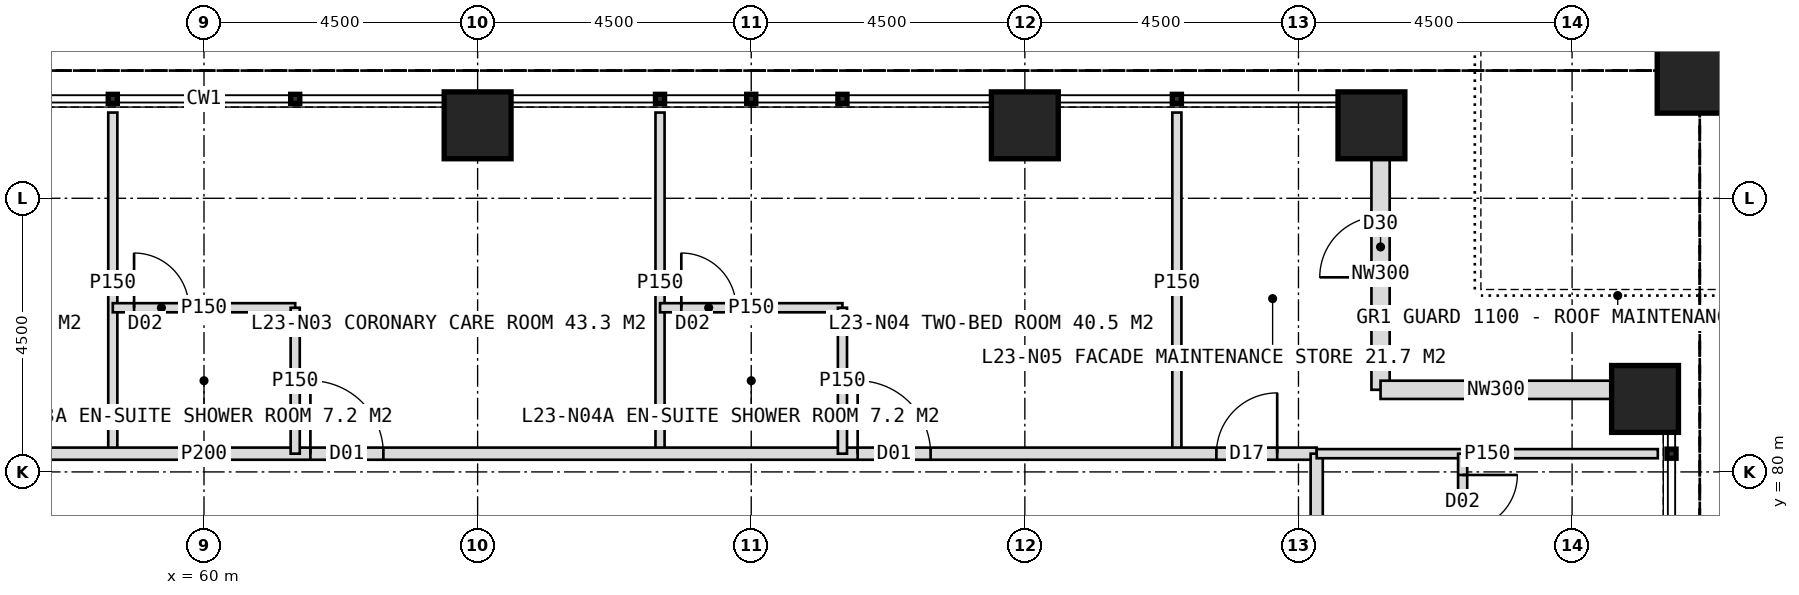
"""IFC4 building model, lengths in metres.
Left out: names, types, materials, properties, quantities, classifications, styles, units other than length and angle.
Written with IfcOpenShell. Run it as: python <this file> out.ifc"""

import sys

from ifc_helpers import new_model, si_unit, direction, frame, frame_2d, origin, origin_2d, place, context, subcontext, project, spatial, rectangle, hollow_rectangle, extrude, element, fill, save


model = new_model("IFC4")
c1 = context("Model", 3, precision=1e-05, world=origin(), true_north=direction((0.0, 1.0)))
c2 = subcontext(c1, "Body", "Model", "MODEL_VIEW")
j1 = project(units=[si_unit("LENGTHUNIT", "METRE"), si_unit("PLANEANGLEUNIT", "RADIAN")], contexts=[c1])
p1 = place(None, origin())
s1 = spatial("IfcSite", under=j1, at=p1, CompositionType="ELEMENT")
p2 = place(p1, origin())
s2 = spatial("IfcBuilding", under=s1, at=p2, CompositionType="ELEMENT")
p3 = place(p2, frame((0.0, 0.0, 100.0)))
s3 = spatial("IfcBuildingStorey", under=s2, at=p3, CompositionType="ELEMENT", Elevation=100.0)
for number, where, z_axis, x_axis in (
    (1, (64.5, 85.7, 0.0), (0.0, 0.0, 1.0), (1.0, 0.0, 0.0)),
    (2, (73.5, 85.7, 0.0), (0.0, 0.0, 1.0), (1.0, 0.0, 0.0)),
    (3, (79.2, 85.7, 0.0), (0.0, 0.0, 1.0), (1.0, 0.0, 0.0)),
    (4, (83.7, 81.2, 0.0), (0.0, 0.0, 1.0), (1.0, 0.0, 0.0)),
):
    element("IfcColumn", number, at=place(p3, frame(where, z_axis=z_axis, x_axis=x_axis)), inside=s3, PredefinedType="COLUMN", context=c2, shape_type="SweptSolid", body=[
        extrude(hollow_rectangle(XDim=1.1, YDim=1.1, WallThickness=0.1, at=origin_2d()), origin(), (0.0, 0.0, 1.0), 4.0),
    ])
p4 = place(p3, frame((84.6, 86.6, 2.0), z_axis=(0.0, 0.0, 1.0), x_axis=(1.0, 0.0, 0.0)))
e5 = element("IfcColumn", 5, at=p4, inside=s3, PredefinedType="COLUMN", context=c2, shape_type="SweptSolid", body=[
    extrude(hollow_rectangle(XDim=1.4, YDim=1.4, WallThickness=0.08, at=origin_2d()), origin(), (0.0, 0.0, 1.0), 2.0),
])
p5 = place(p3, frame((79.35, 85.15, 0.0), z_axis=(0.0, 0.0, 1.0), x_axis=(0.0, -1.0, 0.0)))
e6 = element("IfcWall", 6, at=p5, inside=s3, PredefinedType="ELEMENTEDWALL", context=c2, shape_type="SweptSolid", body=[
    extrude(rectangle(XDim=3.8, YDim=0.3, at=frame_2d((1.9, 0.0))), origin(), (0.0, 0.0, 1.0), 4.0),
])
p6 = place(p5, frame((0.95, 0.0, 0.0)))
e7 = element("IfcOpeningElement", 7, at=p6, cuts=e6, PredefinedType="OPENING", context=c2, shape_type="SweptSolid", body=[
    extrude(rectangle(XDim=1.0, YDim=2.1, at=frame_2d((0.5, 1.05))), frame((0.0, 0.16, 0.0), z_axis=(0.0, -1.0, 0.0), x_axis=(1.0, 0.0, 0.0)), (0.0, 0.0, 1.0), 0.32),
])
p7 = place(p3, frame((79.35, 81.35, 0.0), z_axis=(0.0, 0.0, 1.0), x_axis=(1.0, 0.0, 0.0)))
e8 = element("IfcWall", 8, at=p7, inside=s3, PredefinedType="ELEMENTEDWALL", context=c2, shape_type="SweptSolid", body=[
    extrude(rectangle(XDim=3.8, YDim=0.3, at=frame_2d((1.9, 0.0))), origin(), (0.0, 0.0, 1.0), 4.0),
])
for number, where, z_axis, x_axis in (
    (9, (58.5, 80.3, 0.0), (0.0, 0.0, 1.0), (0.0, 1.0, 0.0)),
    (10, (67.5, 80.3, 0.0), (0.0, 0.0, 1.0), (0.0, 1.0, 0.0)),
    (11, (76.0, 80.3, 0.0), (0.0, 0.0, 1.0), (0.0, 1.0, 0.0)),
):
    element("IfcWall", number, at=place(p3, frame(where, z_axis=z_axis, x_axis=x_axis)), inside=s3, PredefinedType="PARTITIONING", context=c2, shape_type="SweptSolid", body=[
        extrude(rectangle(XDim=5.61, YDim=0.15, at=frame_2d((2.805, 0.0))), origin(), (0.0, 0.0, 1.0), 3.75),
    ])
p8 = place(p3, frame((41.7, 80.3, 0.0), z_axis=(0.0, 0.0, 1.0), x_axis=(1.0, 0.0, 0.0)))
e12 = element("IfcWall", 12, at=p8, inside=s3, PredefinedType="PARTITIONING", context=c2, shape_type="SweptSolid", body=[
    extrude(rectangle(XDim=36.6, YDim=0.2, at=frame_2d((18.3, 0.0))), origin(), (0.0, 0.0, 1.0), 3.75),
])
p9 = place(p8, frame((3.25, 0.0, 0.0)))
e13 = element("IfcOpeningElement", 13, at=p9, cuts=e12, PredefinedType="OPENING", context=c2, shape_type="SweptSolid", body=[
    extrude(rectangle(XDim=1.2, YDim=2.2, at=frame_2d((0.6, 1.1))), frame((0.0, 0.11, 0.0), z_axis=(0.0, -1.0, 0.0), x_axis=(1.0, 0.0, 0.0)), (0.0, 0.0, 1.0), 0.22),
])
p10 = place(p8, frame((11.05, 0.0, 0.0)))
e14 = element("IfcOpeningElement", 14, at=p10, cuts=e12, PredefinedType="OPENING", context=c2, shape_type="SweptSolid", body=[
    extrude(rectangle(XDim=1.2, YDim=2.2, at=frame_2d((0.6, 1.1))), frame((0.0, 0.11, 0.0), z_axis=(0.0, -1.0, 0.0), x_axis=(1.0, 0.0, 0.0)), (0.0, 0.0, 1.0), 0.22),
])
p11 = place(p8, frame((20.05, 0.0, 0.0)))
e15 = element("IfcOpeningElement", 15, at=p11, cuts=e12, PredefinedType="OPENING", context=c2, shape_type="SweptSolid", body=[
    extrude(rectangle(XDim=1.2, YDim=2.2, at=frame_2d((0.6, 1.1))), frame((0.0, 0.11, 0.0), z_axis=(0.0, -1.0, 0.0), x_axis=(1.0, 0.0, 0.0)), (0.0, 0.0, 1.0), 0.22),
])
p12 = place(p8, frame((29.05, 0.0, 0.0)))
e16 = element("IfcOpeningElement", 16, at=p12, cuts=e12, PredefinedType="OPENING", context=c2, shape_type="SweptSolid", body=[
    extrude(rectangle(XDim=1.2, YDim=2.2, at=frame_2d((0.6, 1.1))), frame((0.0, 0.11, 0.0), z_axis=(0.0, -1.0, 0.0), x_axis=(1.0, 0.0, 0.0)), (0.0, 0.0, 1.0), 0.22),
])
p13 = place(p8, frame((34.95, 0.0, 0.0)))
e17 = element("IfcOpeningElement", 17, at=p13, cuts=e12, PredefinedType="OPENING", context=c2, shape_type="SweptSolid", body=[
    extrude(rectangle(XDim=1.0, YDim=2.1, at=frame_2d((0.5, 1.05))), frame((0.0, 0.11, 0.0), z_axis=(0.0, -1.0, 0.0), x_axis=(1.0, 0.0, 0.0)), (0.0, 0.0, 1.0), 0.22),
])
p14 = place(p3, frame((58.5, 82.7, 0.0), z_axis=(0.0, 0.0, 1.0), x_axis=(1.0, 0.0, 0.0)))
e18 = element("IfcWall", 18, at=p14, inside=s3, PredefinedType="PARTITIONING", context=c2, shape_type="SweptSolid", body=[
    extrude(rectangle(XDim=3.0, YDim=0.15, at=frame_2d((1.5, 0.0))), origin(), (0.0, 0.0, 1.0), 3.75),
])
p15 = place(p14, frame((0.35, 0.0, 0.0)))
e19 = element("IfcOpeningElement", 19, at=p15, cuts=e18, PredefinedType="OPENING", context=c2, shape_type="SweptSolid", body=[
    extrude(rectangle(XDim=0.9, YDim=2.1, at=frame_2d((0.45, 1.05))), frame((0.0, 0.085, 0.0), z_axis=(0.0, -1.0, 0.0), x_axis=(1.0, 0.0, 0.0)), (0.0, 0.0, 1.0), 0.17),
])
p16 = place(p3, frame((61.5, 80.3, 0.0), z_axis=(0.0, 0.0, 1.0), x_axis=(0.0, 1.0, 0.0)))
e20 = element("IfcWall", 20, at=p16, inside=s3, PredefinedType="PARTITIONING", context=c2, shape_type="SweptSolid", body=[
    extrude(rectangle(XDim=2.4, YDim=0.15, at=frame_2d((1.2, 0.0))), origin(), (0.0, 0.0, 1.0), 3.75),
])
p17 = place(p3, frame((67.5, 82.7, 0.0), z_axis=(0.0, 0.0, 1.0), x_axis=(1.0, 0.0, 0.0)))
e21 = element("IfcWall", 21, at=p17, inside=s3, PredefinedType="PARTITIONING", context=c2, shape_type="SweptSolid", body=[
    extrude(rectangle(XDim=3.0, YDim=0.15, at=frame_2d((1.5, 0.0))), origin(), (0.0, 0.0, 1.0), 3.75),
])
p18 = place(p17, frame((0.35, 0.0, 0.0)))
e22 = element("IfcOpeningElement", 22, at=p18, cuts=e21, PredefinedType="OPENING", context=c2, shape_type="SweptSolid", body=[
    extrude(rectangle(XDim=0.9, YDim=2.1, at=frame_2d((0.45, 1.05))), frame((0.0, 0.085, 0.0), z_axis=(0.0, -1.0, 0.0), x_axis=(1.0, 0.0, 0.0)), (0.0, 0.0, 1.0), 0.17),
])
p19 = place(p3, frame((70.5, 80.3, 0.0), z_axis=(0.0, 0.0, 1.0), x_axis=(0.0, 1.0, 0.0)))
e23 = element("IfcWall", 23, at=p19, inside=s3, PredefinedType="PARTITIONING", context=c2, shape_type="SweptSolid", body=[
    extrude(rectangle(XDim=2.4, YDim=0.15, at=frame_2d((1.2, 0.0))), origin(), (0.0, 0.0, 1.0), 3.75),
])
p20 = place(p3, frame((78.3, 80.3, 0.0), z_axis=(0.0, 0.0, 1.0), x_axis=(0.0, -1.0, 0.0)))
e24 = element("IfcWall", 24, at=p20, inside=s3, PredefinedType="PARTITIONING", context=c2, shape_type="SweptSolid", body=[
    extrude(rectangle(XDim=36.6, YDim=0.2, at=frame_2d((18.3, 0.0))), origin(), (0.0, 0.0, 1.0), 3.75),
])
p21 = place(p20, frame((3.25, 0.0, 0.0)))
e25 = element("IfcOpeningElement", 25, at=p21, cuts=e24, PredefinedType="OPENING", context=c2, shape_type="SweptSolid", body=[
    extrude(rectangle(XDim=1.2, YDim=2.2, at=frame_2d((0.6, 1.1))), frame((0.0, 0.11, 0.0), z_axis=(0.0, -1.0, 0.0), x_axis=(1.0, 0.0, 0.0)), (0.0, 0.0, 1.0), 0.22),
])
p22 = place(p20, frame((11.05, 0.0, 0.0)))
e26 = element("IfcOpeningElement", 26, at=p22, cuts=e24, PredefinedType="OPENING", context=c2, shape_type="SweptSolid", body=[
    extrude(rectangle(XDim=1.2, YDim=2.2, at=frame_2d((0.6, 1.1))), frame((0.0, 0.11, 0.0), z_axis=(0.0, -1.0, 0.0), x_axis=(1.0, 0.0, 0.0)), (0.0, 0.0, 1.0), 0.22),
])
p23 = place(p20, frame((21.55, 0.0, 0.0)))
e27 = element("IfcOpeningElement", 27, at=p23, cuts=e24, PredefinedType="OPENING", context=c2, shape_type="SweptSolid", body=[
    extrude(rectangle(XDim=1.2, YDim=2.2, at=frame_2d((0.6, 1.1))), frame((0.0, 0.11, 0.0), z_axis=(0.0, -1.0, 0.0), x_axis=(1.0, 0.0, 0.0)), (0.0, 0.0, 1.0), 0.22),
])
p24 = place(p20, frame((32.05, 0.0, 0.0)))
e28 = element("IfcOpeningElement", 28, at=p24, cuts=e24, PredefinedType="OPENING", context=c2, shape_type="SweptSolid", body=[
    extrude(rectangle(XDim=1.2, YDim=2.2, at=frame_2d((0.6, 1.1))), frame((0.0, 0.11, 0.0), z_axis=(0.0, -1.0, 0.0), x_axis=(1.0, 0.0, 0.0)), (0.0, 0.0, 1.0), 0.22),
])
p25 = place(p3, frame((78.3, 80.3, 0.0), z_axis=(0.0, 0.0, 1.0), x_axis=(1.0, 0.0, 0.0)))
e29 = element("IfcWall", 29, at=p25, inside=s3, PredefinedType="PARTITIONING", context=c2, shape_type="SweptSolid", body=[
    extrude(rectangle(XDim=5.61, YDim=0.15, at=frame_2d((2.805, 0.0))), origin(), (0.0, 0.0, 1.0), 3.75),
])
p26 = place(p3, frame((80.7, 80.3, 0.0), z_axis=(0.0, 0.0, 1.0), x_axis=(0.0, -1.0, 0.0)))
e30 = element("IfcWall", 30, at=p26, inside=s3, PredefinedType="PARTITIONING", context=c2, shape_type="SweptSolid", body=[
    extrude(rectangle(XDim=3.0, YDim=0.15, at=frame_2d((1.5, 0.0))), origin(), (0.0, 0.0, 1.0), 3.75),
])
p27 = place(p26, frame((0.35, 0.0, 0.0)))
e31 = element("IfcOpeningElement", 31, at=p27, cuts=e30, PredefinedType="OPENING", context=c2, shape_type="SweptSolid", body=[
    extrude(rectangle(XDim=0.9, YDim=2.1, at=frame_2d((0.45, 1.05))), frame((0.0, 0.085, 0.0), z_axis=(0.0, -1.0, 0.0), x_axis=(1.0, 0.0, 0.0)), (0.0, 0.0, 1.0), 0.17),
])
p28 = place(p11, origin())
e32 = element("IfcDoor", 32, at=p28, inside=s3, OperationType="SINGLE_SWING_LEFT", PredefinedType="DOOR", context=c2, shape_type="SweptSolid", body=[
    extrude(rectangle(XDim=1.2, YDim=2.2, at=frame_2d((0.6, 1.1))), frame((0.0, 0.025, 0.0), z_axis=(0.0, -1.0, 0.0), x_axis=(1.0, 0.0, 0.0)), (0.0, 0.0, 1.0), 0.05),
])
fill(e15, e32)
p29 = place(p15, origin())
e33 = element("IfcDoor", 33, at=p29, inside=s3, OperationType="SINGLE_SWING_LEFT", PredefinedType="DOOR", context=c2, shape_type="SweptSolid", body=[
    extrude(rectangle(XDim=0.9, YDim=2.1, at=frame_2d((0.45, 1.05))), frame((0.0, 0.025, 0.0), z_axis=(0.0, -1.0, 0.0), x_axis=(1.0, 0.0, 0.0)), (0.0, 0.0, 1.0), 0.05),
])
fill(e19, e33)
p30 = place(p12, origin())
e34 = element("IfcDoor", 34, at=p30, inside=s3, OperationType="SINGLE_SWING_LEFT", PredefinedType="DOOR", context=c2, shape_type="SweptSolid", body=[
    extrude(rectangle(XDim=1.2, YDim=2.2, at=frame_2d((0.6, 1.1))), frame((0.0, 0.025, 0.0), z_axis=(0.0, -1.0, 0.0), x_axis=(1.0, 0.0, 0.0)), (0.0, 0.0, 1.0), 0.05),
])
fill(e16, e34)
p31 = place(p18, origin())
e35 = element("IfcDoor", 35, at=p31, inside=s3, OperationType="SINGLE_SWING_LEFT", PredefinedType="DOOR", context=c2, shape_type="SweptSolid", body=[
    extrude(rectangle(XDim=0.9, YDim=2.1, at=frame_2d((0.45, 1.05))), frame((0.0, 0.025, 0.0), z_axis=(0.0, -1.0, 0.0), x_axis=(1.0, 0.0, 0.0)), (0.0, 0.0, 1.0), 0.05),
])
fill(e22, e35)
p32 = place(p13, origin())
e36 = element("IfcDoor", 36, at=p32, inside=s3, OperationType="SINGLE_SWING_RIGHT", PredefinedType="DOOR", context=c2, shape_type="SweptSolid", body=[
    extrude(rectangle(XDim=1.0, YDim=2.1, at=frame_2d((0.5, 1.05))), frame((0.0, 0.025, 0.0), z_axis=(0.0, -1.0, 0.0), x_axis=(1.0, 0.0, 0.0)), (0.0, 0.0, 1.0), 0.05),
])
fill(e17, e36)
p33 = place(p27, origin())
e37 = element("IfcDoor", 37, at=p33, inside=s3, OperationType="SINGLE_SWING_LEFT", PredefinedType="DOOR", context=c2, shape_type="SweptSolid", body=[
    extrude(rectangle(XDim=0.9, YDim=2.1, at=frame_2d((0.45, 1.05))), frame((0.0, 0.025, 0.0), z_axis=(0.0, -1.0, 0.0), x_axis=(1.0, 0.0, 0.0)), (0.0, 0.0, 1.0), 0.05),
])
fill(e31, e37)
p34 = place(p6, frame((1.0, 0.0, 0.0), z_axis=(0.0, 0.0, 1.0), x_axis=(-1.0, 0.0, 0.0)))
e38 = element("IfcDoor", 38, at=p34, inside=s3, OperationType="SINGLE_SWING_LEFT", PredefinedType="DOOR", context=c2, shape_type="SweptSolid", body=[
    extrude(rectangle(XDim=1.0, YDim=2.1, at=frame_2d((0.5, 1.05))), frame((0.0, 0.025, 0.0), z_axis=(0.0, -1.0, 0.0), x_axis=(1.0, 0.0, 0.0)), (0.0, 0.0, 1.0), 0.05),
])
fill(e7, e38)
save(model, sys.argv[1])
